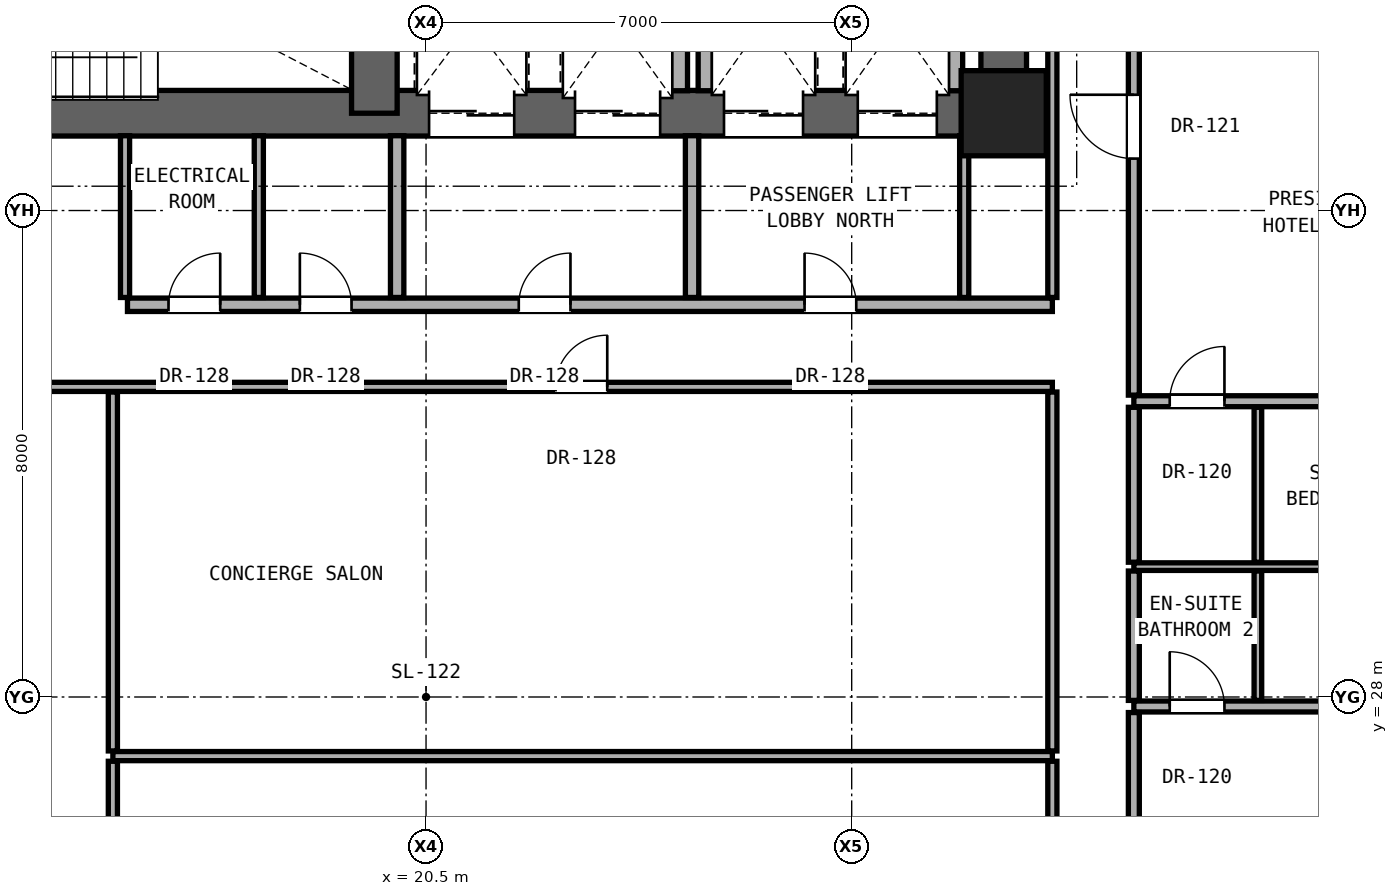
"""IFC4 building model, lengths in metres.
Left out: names, types, materials, properties, quantities, classifications, styles, units other than length and angle.
Written with IfcOpenShell. Run it as: python <this file> out.ifc"""

import sys

from ifc_helpers import new_model, si_unit, direction, frame, frame_2d, origin, origin_2d, place, context, subcontext, project, spatial, rectangle, extrude, element, fill, save


model = new_model("IFC4")
c1 = context("Model", 3, precision=1e-05, world=origin(), true_north=direction((0.0, 1.0)))
c2 = subcontext(c1, "Body", "Model", "MODEL_VIEW")
j1 = project(units=[si_unit("LENGTHUNIT", "METRE"), si_unit("PLANEANGLEUNIT", "RADIAN")], contexts=[c1])
p1 = place(None, origin())
s1 = spatial("IfcSite", under=j1, at=p1, CompositionType="ELEMENT")
p2 = place(p1, origin())
s2 = spatial("IfcBuilding", under=s1, at=p2, CompositionType="ELEMENT")
p3 = place(p2, frame((0.0, 0.0, 32.3)))
s3 = spatial("IfcBuildingStorey", under=s2, at=p3, CompositionType="ELEMENT", Elevation=32.3)
p4 = place(p3, frame((30.0, 37.6, 0.0), z_axis=(0.0, 0.0, 1.0), x_axis=(1.0, 0.0, 0.0)))
e1 = element("IfcColumn", 1, at=p4, inside=s3, PredefinedType="COLUMN", context=c2, shape_type="SweptSolid", body=[
    extrude(rectangle(XDim=1.4, YDim=1.4, at=origin_2d()), origin(), (0.0, 0.0, 1.0), 3.3),
])
p5 = place(p3, frame((30.0, 37.6, 0.0), z_axis=(0.0, 0.0, 1.0), x_axis=(0.0, 1.0, 0.0)))
e2 = element("IfcWall", 2, at=p5, inside=s3, PredefinedType="SHEAR", context=c2, shape_type="SweptSolid", body=[
    extrude(rectangle(XDim=6.0, YDim=0.75, at=frame_2d((3.0, 0.0))), origin(), (0.0, 0.0, 1.0), 3.06),
])
p6 = place(p3, frame((11.0, 37.6, 0.0), z_axis=(0.0, 0.0, 1.0), x_axis=(1.0, 0.0, 0.0)))
e3 = element("IfcWall", 3, at=p6, inside=s3, PredefinedType="SHEAR", context=c2, shape_type="SweptSolid", body=[
    extrude(rectangle(XDim=19.0, YDim=0.75, at=frame_2d((9.5, 0.0))), origin(), (0.0, 0.0, 1.0), 3.06),
])
p7 = place(p6, frame((1.06, 0.0, 0.0)))
e4 = element("IfcOpeningElement", 4, at=p7, cuts=e3, PredefinedType="OPENING", context=c2, shape_type="SweptSolid", body=[
    extrude(rectangle(XDim=1.15, YDim=2.2, at=frame_2d((0.575, 1.1))), frame((0.0, 0.385, 0.0), z_axis=(0.0, -1.0, 0.0), x_axis=(1.0, 0.0, 0.0)), (0.0, 0.0, 1.0), 0.77),
])
p8 = place(p6, frame((9.55, 0.0, 0.0)))
e5 = element("IfcOpeningElement", 5, at=p8, cuts=e3, PredefinedType="OPENING", context=c2, shape_type="SweptSolid", body=[
    extrude(rectangle(XDim=1.4, YDim=2.35, at=frame_2d((0.7, 1.175))), frame((0.0, 0.385, 0.0), z_axis=(0.0, -1.0, 0.0), x_axis=(1.0, 0.0, 0.0)), (0.0, 0.0, 1.0), 0.77),
])
p9 = place(p6, frame((11.95, 0.0, 0.0)))
e6 = element("IfcOpeningElement", 6, at=p9, cuts=e3, PredefinedType="OPENING", context=c2, shape_type="SweptSolid", body=[
    extrude(rectangle(XDim=1.4, YDim=2.35, at=frame_2d((0.7, 1.175))), frame((0.0, 0.385, 0.0), z_axis=(0.0, -1.0, 0.0), x_axis=(1.0, 0.0, 0.0)), (0.0, 0.0, 1.0), 0.77),
])
p10 = place(p6, frame((14.4, 0.0, 0.0)))
e7 = element("IfcOpeningElement", 7, at=p10, cuts=e3, PredefinedType="OPENING", context=c2, shape_type="SweptSolid", body=[
    extrude(rectangle(XDim=1.3, YDim=2.3, at=frame_2d((0.65, 1.15))), frame((0.0, 0.385, 0.0), z_axis=(0.0, -1.0, 0.0), x_axis=(1.0, 0.0, 0.0)), (0.0, 0.0, 1.0), 0.77),
])
p11 = place(p6, frame((16.6, 0.0, 0.0)))
e8 = element("IfcOpeningElement", 8, at=p11, cuts=e3, PredefinedType="OPENING", context=c2, shape_type="SweptSolid", body=[
    extrude(rectangle(XDim=1.3, YDim=2.3, at=frame_2d((0.65, 1.15))), frame((0.0, 0.385, 0.0), z_axis=(0.0, -1.0, 0.0), x_axis=(1.0, 0.0, 0.0)), (0.0, 0.0, 1.0), 0.77),
])
p12 = place(p3, frame((19.65, 37.6, 0.0), z_axis=(0.0, 0.0, 1.0), x_axis=(0.0, 1.0, 0.0)))
e9 = element("IfcWall", 9, at=p12, inside=s3, PredefinedType="SHEAR", context=c2, shape_type="SweptSolid", body=[
    extrude(rectangle(XDim=3.543, YDim=0.75, at=frame_2d((1.771, 0.0))), origin(), (0.0, 0.0, 1.0), 3.06),
])
p13 = place(p3, frame((15.35, 27.028, 0.0), z_axis=(0.0, 0.0, 1.0), x_axis=(1.0, 0.0, 0.0)))
e10 = element("IfcWall", 10, at=p13, inside=s3, PredefinedType="PARTITIONING", context=c2, shape_type="SweptSolid", body=[
    extrude(rectangle(XDim=15.45, YDim=0.15, at=frame_2d((7.725, 0.0))), origin(), (0.0, 0.0, 1.0), 2.104),
])
p14 = place(p3, frame((32.14, 27.844, 0.0), z_axis=(0.0, 0.0, 1.0), x_axis=(1.0, 0.0, 0.0)))
e11 = element("IfcWall", 11, at=p14, inside=s3, PredefinedType="PARTITIONING", context=c2, shape_type="SweptSolid", body=[
    extrude(rectangle(XDim=10.18, YDim=0.18, at=frame_2d((5.09, 0.0))), origin(), (0.0, 0.0, 1.0), 2.125),
])
p15 = place(p14, frame((5.665, 0.0, 0.0)))
e12 = element("IfcOpeningElement", 12, at=p15, cuts=e11, PredefinedType="OPENING", context=c2, shape_type="SweptSolid", body=[
    extrude(rectangle(XDim=0.85, YDim=2.01, at=frame_2d((0.425, 1.005))), frame((0.0, 0.1, 0.0), z_axis=(0.0, -1.0, 0.0), x_axis=(1.0, 0.0, 0.0)), (0.0, 0.0, 1.0), 0.2),
])
p16 = place(p14, frame((0.59, 0.0, 0.0)))
e13 = element("IfcOpeningElement", 13, at=p16, cuts=e11, PredefinedType="OPENING", context=c2, shape_type="SweptSolid", body=[
    extrude(rectangle(XDim=0.9, YDim=2.1, at=frame_2d((0.45, 1.05))), frame((0.0, 0.1, 0.0), z_axis=(0.0, -1.0, 0.0), x_axis=(1.0, 0.0, 0.0)), (0.0, 0.0, 1.0), 0.2),
])
p17 = place(p3, frame((32.14, 30.144, 0.0), z_axis=(0.0, 0.0, 1.0), x_axis=(1.0, 0.0, 0.0)))
e14 = element("IfcWall", 14, at=p17, inside=s3, PredefinedType="PARTITIONING", context=c2, shape_type="SweptSolid", body=[
    extrude(rectangle(XDim=10.18, YDim=0.125, at=frame_2d((5.09, 0.0))), origin(), (0.0, 0.0, 1.0), 2.125),
])
p18 = place(p3, frame((32.14, 32.864, 0.0), z_axis=(0.0, 0.0, 1.0), x_axis=(1.0, 0.0, 0.0)))
e15 = element("IfcWall", 15, at=p18, inside=s3, PredefinedType="PARTITIONING", context=c2, shape_type="SweptSolid", body=[
    extrude(rectangle(XDim=10.18, YDim=0.18, at=frame_2d((5.09, 0.0))), origin(), (0.0, 0.0, 1.0), 2.125),
])
p19 = place(p18, frame((5.065, 0.0, 0.0)))
e16 = element("IfcOpeningElement", 16, at=p19, cuts=e15, PredefinedType="OPENING", context=c2, shape_type="SweptSolid", body=[
    extrude(rectangle(XDim=0.85, YDim=2.01, at=frame_2d((0.425, 1.005))), frame((0.0, 0.1, 0.0), z_axis=(0.0, -1.0, 0.0), x_axis=(1.0, 0.0, 0.0)), (0.0, 0.0, 1.0), 0.2),
])
p20 = place(p18, frame((0.59, 0.0, 0.0)))
e17 = element("IfcOpeningElement", 17, at=p20, cuts=e15, PredefinedType="OPENING", context=c2, shape_type="SweptSolid", body=[
    extrude(rectangle(XDim=0.9, YDim=2.1, at=frame_2d((0.45, 1.05))), frame((0.0, 0.1, 0.0), z_axis=(0.0, -1.0, 0.0), x_axis=(1.0, 0.0, 0.0)), (0.0, 0.0, 1.0), 0.2),
])
p21 = place(p3, frame((10.2, 33.1, 0.0), z_axis=(0.0, 0.0, 1.0), x_axis=(1.0, 0.0, 0.0)))
e18 = element("IfcWall", 18, at=p21, inside=s3, PredefinedType="PARTITIONING", context=c2, shape_type="SweptSolid", body=[
    extrude(rectangle(XDim=20.6, YDim=0.15, at=frame_2d((10.3, 0.0))), origin(), (0.0, 0.0, 1.0), 2.104),
])
p22 = place(p21, frame((12.43, 0.0, 0.0)))
e19 = element("IfcOpeningElement", 19, at=p22, cuts=e18, PredefinedType="OPENING", context=c2, shape_type="SweptSolid", body=[
    extrude(rectangle(XDim=0.85, YDim=2.01, at=frame_2d((0.425, 1.005))), frame((0.0, 0.085, 0.0), z_axis=(0.0, -1.0, 0.0), x_axis=(1.0, 0.0, 0.0)), (0.0, 0.0, 1.0), 0.17),
])
p23 = place(p3, frame((15.59, 34.45, 0.0), z_axis=(0.0, 0.0, 1.0), x_axis=(1.0, 0.0, 0.0)))
e20 = element("IfcWall", 20, at=p23, inside=s3, PredefinedType="SOLIDWALL", context=c2, shape_type="SweptSolid", body=[
    extrude(rectangle(XDim=15.21, YDim=0.22, at=frame_2d((7.605, 0.0))), origin(), (0.0, 0.0, 1.0), 2.104),
])
p24 = place(p23, frame((6.435, 0.0, 0.0)))
e21 = element("IfcOpeningElement", 21, at=p24, cuts=e20, PredefinedType="OPENING", context=c2, shape_type="SweptSolid", body=[
    extrude(rectangle(XDim=0.85, YDim=2.01, at=frame_2d((0.425, 1.005))), frame((0.0, 0.12, 0.0), z_axis=(0.0, -1.0, 0.0), x_axis=(1.0, 0.0, 0.0)), (0.0, 0.0, 1.0), 0.24),
])
p25 = place(p23, frame((11.135, 0.0, 0.0)))
e22 = element("IfcOpeningElement", 22, at=p25, cuts=e20, PredefinedType="OPENING", context=c2, shape_type="SweptSolid", body=[
    extrude(rectangle(XDim=0.85, YDim=2.01, at=frame_2d((0.425, 1.005))), frame((0.0, 0.12, 0.0), z_axis=(0.0, -1.0, 0.0), x_axis=(1.0, 0.0, 0.0)), (0.0, 0.0, 1.0), 0.24),
])
p26 = place(p23, frame((0.675, 0.0, 0.0)))
e23 = element("IfcOpeningElement", 23, at=p26, cuts=e20, PredefinedType="OPENING", context=c2, shape_type="SweptSolid", body=[
    extrude(rectangle(XDim=0.85, YDim=2.01, at=frame_2d((0.425, 1.005))), frame((0.0, 0.12, 0.0), z_axis=(0.0, -1.0, 0.0), x_axis=(1.0, 0.0, 0.0)), (0.0, 0.0, 1.0), 0.24),
])
p27 = place(p23, frame((2.835, 0.0, 0.0)))
e24 = element("IfcOpeningElement", 24, at=p27, cuts=e20, PredefinedType="OPENING", context=c2, shape_type="SweptSolid", body=[
    extrude(rectangle(XDim=0.85, YDim=2.01, at=frame_2d((0.425, 1.005))), frame((0.0, 0.12, 0.0), z_axis=(0.0, -1.0, 0.0), x_axis=(1.0, 0.0, 0.0)), (0.0, 0.0, 1.0), 0.24),
])
p28 = place(p3, frame((15.35, 22.935, 0.0), z_axis=(0.0, 0.0, 1.0), x_axis=(0.0, 1.0, 0.0)))
e25 = element("IfcWall", 25, at=p28, inside=s3, PredefinedType="PARTITIONING", context=c2, shape_type="SweptSolid", body=[
    extrude(rectangle(XDim=4.008, YDim=0.15, at=frame_2d((2.004, 0.0))), origin(), (0.0, 0.0, 1.0), 2.104),
])
p29 = place(p3, frame((15.35, 27.113, 0.0), z_axis=(0.0, 0.0, 1.0), x_axis=(0.0, 1.0, 0.0)))
e26 = element("IfcWall", 26, at=p29, inside=s3, PredefinedType="PARTITIONING", context=c2, shape_type="SweptSolid", body=[
    extrude(rectangle(XDim=5.902, YDim=0.15, at=frame_2d((2.951, 0.0))), origin(), (0.0, 0.0, 1.0), 2.104),
])
p30 = place(p3, frame((15.55, 34.57, 0.0), z_axis=(0.0, 0.0, 1.0), x_axis=(0.0, 1.0, 0.0)))
e27 = element("IfcWall", 27, at=p30, inside=s3, PredefinedType="PARTITIONING", context=c2, shape_type="SweptSolid", body=[
    extrude(rectangle(XDim=2.66, YDim=0.15, at=frame_2d((1.33, 0.0))), origin(), (0.0, 0.0, 1.0), 2.589),
])
p31 = place(p3, frame((17.75, 34.57, 0.0), z_axis=(0.0, 0.0, 1.0), x_axis=(0.0, 1.0, 0.0)))
e28 = element("IfcWall", 28, at=p31, inside=s3, PredefinedType="PARTITIONING", context=c2, shape_type="SweptSolid", body=[
    extrude(rectangle(XDim=2.66, YDim=0.15, at=frame_2d((1.33, 0.0))), origin(), (0.0, 0.0, 1.0), 3.06),
])
p32 = place(p3, frame((20.025, 34.57, 0.0), z_axis=(0.0, 0.0, 1.0), x_axis=(0.0, 1.0, 0.0)))
e29 = element("IfcWall", 29, at=p32, inside=s3, PredefinedType="SOLIDWALL", context=c2, shape_type="SweptSolid", body=[
    extrude(rectangle(XDim=2.66, YDim=0.22, at=frame_2d((1.33, 0.0))), origin(), (0.0, 0.0, 1.0), 3.06),
])
p33 = place(p3, frame((24.65, 37.97, 0.0), z_axis=(0.0, 0.0, 1.0), x_axis=(0.0, 1.0, 0.0)))
e30 = element("IfcWall", 30, at=p33, inside=s3, PredefinedType="SOLIDWALL", context=c2, shape_type="SweptSolid", body=[
    extrude(rectangle(XDim=2.27, YDim=0.3, at=frame_2d((1.135, 0.0))), origin(), (0.0, 0.0, 1.0), 3.06),
])
p34 = place(p3, frame((24.875, 34.57, 0.0), z_axis=(0.0, 0.0, 1.0), x_axis=(0.0, 1.0, 0.0)))
e31 = element("IfcWall", 31, at=p34, inside=s3, PredefinedType="SOLIDWALL", context=c2, shape_type="SweptSolid", body=[
    extrude(rectangle(XDim=2.66, YDim=0.22, at=frame_2d((1.33, 0.0))), origin(), (0.0, 0.0, 1.0), 3.06),
])
p35 = place(p3, frame((25.1, 37.97, 0.0), z_axis=(0.0, 0.0, 1.0), x_axis=(0.0, 1.0, 0.0)))
e32 = element("IfcWall", 32, at=p35, inside=s3, PredefinedType="SOLIDWALL", context=c2, shape_type="SweptSolid", body=[
    extrude(rectangle(XDim=2.245, YDim=0.25, at=frame_2d((1.123, 0.0))), origin(), (0.0, 0.0, 1.0), 3.06),
])
p36 = place(p3, frame((29.35, 34.57, 0.0), z_axis=(0.0, 0.0, 1.0), x_axis=(0.0, 1.0, 0.0)))
e33 = element("IfcWall", 33, at=p36, inside=s3, PredefinedType="PARTITIONING", context=c2, shape_type="SweptSolid", body=[
    extrude(rectangle(XDim=2.66, YDim=0.15, at=frame_2d((1.33, 0.0))), origin(), (0.0, 0.0, 1.0), 3.06),
])
p37 = place(p3, frame((29.2, 37.97, 0.0), z_axis=(0.0, 0.0, 1.0), x_axis=(0.0, 1.0, 0.0)))
e34 = element("IfcWall", 34, at=p37, inside=s3, PredefinedType="SOLIDWALL", context=c2, shape_type="SweptSolid", body=[
    extrude(rectangle(XDim=2.245, YDim=0.25, at=frame_2d((1.123, 0.0))), origin(), (0.0, 0.0, 1.0), 3.06),
])
p38 = place(p3, frame((30.8, 19.985, 0.0), z_axis=(0.0, 0.0, 1.0), x_axis=(0.0, 1.0, 0.0)))
e35 = element("IfcWall", 35, at=p38, inside=s3, PredefinedType="PARTITIONING", context=c2, shape_type="SweptSolid", body=[
    extrude(rectangle(XDim=6.958, YDim=0.15, at=frame_2d((3.479, 0.0))), origin(), (0.0, 0.0, 1.0), 2.279),
])
p39 = place(p3, frame((30.8, 27.113, 0.0), z_axis=(0.0, 0.0, 1.0), x_axis=(0.0, 1.0, 0.0)))
e36 = element("IfcWall", 36, at=p39, inside=s3, PredefinedType="PARTITIONING", context=c2, shape_type="SweptSolid", body=[
    extrude(rectangle(XDim=5.902, YDim=0.15, at=frame_2d((2.951, 0.0))), origin(), (0.0, 0.0, 1.0), 2.279),
])
p40 = place(p3, frame((30.8, 34.57, 0.0), z_axis=(0.0, 0.0, 1.0), x_axis=(0.0, 1.0, 0.0)))
e37 = element("IfcWall", 37, at=p40, inside=s3, PredefinedType="PARTITIONING", context=c2, shape_type="SweptSolid", body=[
    extrude(rectangle(XDim=9.095, YDim=0.15, at=frame_2d((4.547, 0.0))), origin(), (0.0, 0.0, 1.0), 2.436),
])
p41 = place(p3, frame((32.14, 21.864, 0.0), z_axis=(0.0, 0.0, 1.0), x_axis=(0.0, 1.0, 0.0)))
e38 = element("IfcWall", 38, at=p41, inside=s3, PredefinedType="PARTITIONING", context=c2, shape_type="SweptSolid", body=[
    extrude(rectangle(XDim=5.88, YDim=0.18, at=frame_2d((2.94, 0.0))), origin(), (0.0, 0.0, 1.0), 2.279),
])
p42 = place(p41, frame((2.415, 0.0, 0.0)))
e39 = element("IfcOpeningElement", 39, at=p42, cuts=e38, PredefinedType="OPENING", context=c2, shape_type="SweptSolid", body=[
    extrude(rectangle(XDim=1.05, YDim=2.2, at=frame_2d((0.525, 1.1))), frame((0.0, 0.1, 0.0), z_axis=(0.0, -1.0, 0.0), x_axis=(1.0, 0.0, 0.0)), (0.0, 0.0, 1.0), 0.2),
])
p43 = place(p3, frame((32.14, 27.944, 0.0), z_axis=(0.0, 0.0, 1.0), x_axis=(0.0, 1.0, 0.0)))
e40 = element("IfcWall", 40, at=p43, inside=s3, PredefinedType="PARTITIONING", context=c2, shape_type="SweptSolid", body=[
    extrude(rectangle(XDim=2.127, YDim=0.18, at=frame_2d((1.064, 0.0))), origin(), (0.0, 0.0, 1.0), 3.06),
])
p44 = place(p3, frame((32.14, 30.217, 0.0), z_axis=(0.0, 0.0, 1.0), x_axis=(0.0, 1.0, 0.0)))
e41 = element("IfcWall", 41, at=p44, inside=s3, PredefinedType="PARTITIONING", context=c2, shape_type="SweptSolid", body=[
    extrude(rectangle(XDim=2.547, YDim=0.18, at=frame_2d((1.274, 0.0))), origin(), (0.0, 0.0, 1.0), 2.279),
])
p45 = place(p3, frame((32.14, 32.964, 0.0), z_axis=(0.0, 0.0, 1.0), x_axis=(0.0, 1.0, 0.0)))
e42 = element("IfcWall", 42, at=p45, inside=s3, PredefinedType="PARTITIONING", context=c2, shape_type="SweptSolid", body=[
    extrude(rectangle(XDim=8.83, YDim=0.18, at=frame_2d((4.415, 0.0))), origin(), (0.0, 0.0, 1.0), 2.436),
])
p46 = place(p45, frame((3.89, 0.0, 0.0)))
e43 = element("IfcOpeningElement", 43, at=p46, cuts=e42, PredefinedType="OPENING", context=c2, shape_type="SweptSolid", body=[
    extrude(rectangle(XDim=1.05, YDim=2.2, at=frame_2d((0.525, 1.1))), frame((0.0, 0.1, 0.0), z_axis=(0.0, -1.0, 0.0), x_axis=(1.0, 0.0, 0.0)), (0.0, 0.0, 1.0), 0.2),
])
p47 = place(p3, frame((34.18, 27.944, 0.0), z_axis=(0.0, 0.0, 1.0), x_axis=(0.0, 1.0, 0.0)))
e44 = element("IfcWall", 44, at=p47, inside=s3, PredefinedType="PARTITIONING", context=c2, shape_type="SweptSolid", body=[
    extrude(rectangle(XDim=2.127, YDim=0.125, at=frame_2d((1.064, 0.0))), origin(), (0.0, 0.0, 1.0), 3.06),
])
p48 = place(p3, frame((34.18, 30.217, 0.0), z_axis=(0.0, 0.0, 1.0), x_axis=(0.0, 1.0, 0.0)))
e45 = element("IfcWall", 45, at=p48, inside=s3, PredefinedType="PARTITIONING", context=c2, shape_type="SweptSolid", body=[
    extrude(rectangle(XDim=2.547, YDim=0.125, at=frame_2d((1.274, 0.0))), origin(), (0.0, 0.0, 1.0), 2.279),
])
p49 = place(p24, origin())
e46 = element("IfcDoor", 46, at=p49, inside=s3, OperationType="SINGLE_SWING_RIGHT", PredefinedType="DOOR", context=c2, shape_type="SweptSolid", body=[
    extrude(rectangle(XDim=0.85, YDim=2.01, at=frame_2d((0.425, 1.005))), frame((0.0, 0.025, 0.0), z_axis=(0.0, -1.0, 0.0), x_axis=(1.0, 0.0, 0.0)), (0.0, 0.0, 1.0), 0.05),
])
fill(e21, e46)
p50 = place(p25, origin())
e47 = element("IfcDoor", 47, at=p50, inside=s3, OperationType="SINGLE_SWING_LEFT", PredefinedType="DOOR", context=c2, shape_type="SweptSolid", body=[
    extrude(rectangle(XDim=0.85, YDim=2.01, at=frame_2d((0.425, 1.005))), frame((0.0, 0.025, 0.0), z_axis=(0.0, -1.0, 0.0), x_axis=(1.0, 0.0, 0.0)), (0.0, 0.0, 1.0), 0.05),
])
fill(e22, e47)
p51 = place(p26, origin())
e48 = element("IfcDoor", 48, at=p51, inside=s3, OperationType="SINGLE_SWING_RIGHT", PredefinedType="DOOR", context=c2, shape_type="SweptSolid", body=[
    extrude(rectangle(XDim=0.85, YDim=2.01, at=frame_2d((0.425, 1.005))), frame((0.0, 0.025, 0.0), z_axis=(0.0, -1.0, 0.0), x_axis=(1.0, 0.0, 0.0)), (0.0, 0.0, 1.0), 0.05),
])
fill(e23, e48)
p52 = place(p27, origin())
e49 = element("IfcDoor", 49, at=p52, inside=s3, OperationType="SINGLE_SWING_LEFT", PredefinedType="DOOR", context=c2, shape_type="SweptSolid", body=[
    extrude(rectangle(XDim=0.85, YDim=2.01, at=frame_2d((0.425, 1.005))), frame((0.0, 0.025, 0.0), z_axis=(0.0, -1.0, 0.0), x_axis=(1.0, 0.0, 0.0)), (0.0, 0.0, 1.0), 0.05),
])
fill(e24, e49)
p53 = place(p16, origin())
e50 = element("IfcDoor", 50, at=p53, inside=s3, OperationType="SINGLE_SWING_LEFT", PredefinedType="DOOR", context=c2, shape_type="SweptSolid", body=[
    extrude(rectangle(XDim=0.9, YDim=2.1, at=frame_2d((0.45, 1.05))), frame((0.0, 0.025, 0.0), z_axis=(0.0, -1.0, 0.0), x_axis=(1.0, 0.0, 0.0)), (0.0, 0.0, 1.0), 0.05),
])
fill(e13, e50)
p54 = place(p46, origin())
e51 = element("IfcDoor", 51, at=p54, inside=s3, OperationType="SINGLE_SWING_RIGHT", PredefinedType="DOOR", context=c2, shape_type="SweptSolid", body=[
    extrude(rectangle(XDim=1.05, YDim=2.2, at=frame_2d((0.525, 1.1))), frame((0.0, 0.025, 0.0), z_axis=(0.0, -1.0, 0.0), x_axis=(1.0, 0.0, 0.0)), (0.0, 0.0, 1.0), 0.05),
])
fill(e43, e51)
p55 = place(p20, origin())
e52 = element("IfcDoor", 52, at=p55, inside=s3, OperationType="SINGLE_SWING_RIGHT", PredefinedType="DOOR", context=c2, shape_type="SweptSolid", body=[
    extrude(rectangle(XDim=0.9, YDim=2.1, at=frame_2d((0.45, 1.05))), frame((0.0, 0.025, 0.0), z_axis=(0.0, -1.0, 0.0), x_axis=(1.0, 0.0, 0.0)), (0.0, 0.0, 1.0), 0.05),
])
fill(e17, e52)
p56 = place(p22, origin())
e53 = element("IfcDoor", 53, at=p56, inside=s3, OperationType="SINGLE_SWING_RIGHT", PredefinedType="DOOR", context=c2, shape_type="SweptSolid", body=[
    extrude(rectangle(XDim=0.85, YDim=2.01, at=frame_2d((0.425, 1.005))), frame((0.0, 0.025, 0.0), z_axis=(0.0, -1.0, 0.0), x_axis=(1.0, 0.0, 0.0)), (0.0, 0.0, 1.0), 0.05),
])
fill(e19, e53)
p57 = place(p8, origin())
e54 = element("IfcDoor", 54, at=p57, inside=s3, OperationType="DOUBLE_DOOR_SLIDING", PredefinedType="DOOR", context=c2, shape_type="SweptSolid", body=[
    extrude(rectangle(XDim=1.4, YDim=2.35, at=frame_2d((0.7, 1.175))), frame((0.0, 0.025, 0.0), z_axis=(0.0, -1.0, 0.0), x_axis=(1.0, 0.0, 0.0)), (0.0, 0.0, 1.0), 0.05),
])
fill(e5, e54)
p58 = place(p9, origin())
e55 = element("IfcDoor", 55, at=p58, inside=s3, OperationType="DOUBLE_DOOR_SLIDING", PredefinedType="DOOR", context=c2, shape_type="SweptSolid", body=[
    extrude(rectangle(XDim=1.4, YDim=2.35, at=frame_2d((0.7, 1.175))), frame((0.0, 0.025, 0.0), z_axis=(0.0, -1.0, 0.0), x_axis=(1.0, 0.0, 0.0)), (0.0, 0.0, 1.0), 0.05),
])
fill(e6, e55)
p59 = place(p10, origin())
e56 = element("IfcDoor", 56, at=p59, inside=s3, OperationType="DOUBLE_DOOR_SLIDING", PredefinedType="DOOR", context=c2, shape_type="SweptSolid", body=[
    extrude(rectangle(XDim=1.3, YDim=2.3, at=frame_2d((0.65, 1.15))), frame((0.0, 0.025, 0.0), z_axis=(0.0, -1.0, 0.0), x_axis=(1.0, 0.0, 0.0)), (0.0, 0.0, 1.0), 0.05),
])
fill(e7, e56)
p60 = place(p11, origin())
e57 = element("IfcDoor", 57, at=p60, inside=s3, OperationType="DOUBLE_DOOR_SLIDING", PredefinedType="DOOR", context=c2, shape_type="SweptSolid", body=[
    extrude(rectangle(XDim=1.3, YDim=2.3, at=frame_2d((0.65, 1.15))), frame((0.0, 0.025, 0.0), z_axis=(0.0, -1.0, 0.0), x_axis=(1.0, 0.0, 0.0)), (0.0, 0.0, 1.0), 0.05),
])
fill(e8, e57)
save(model, sys.argv[1])
